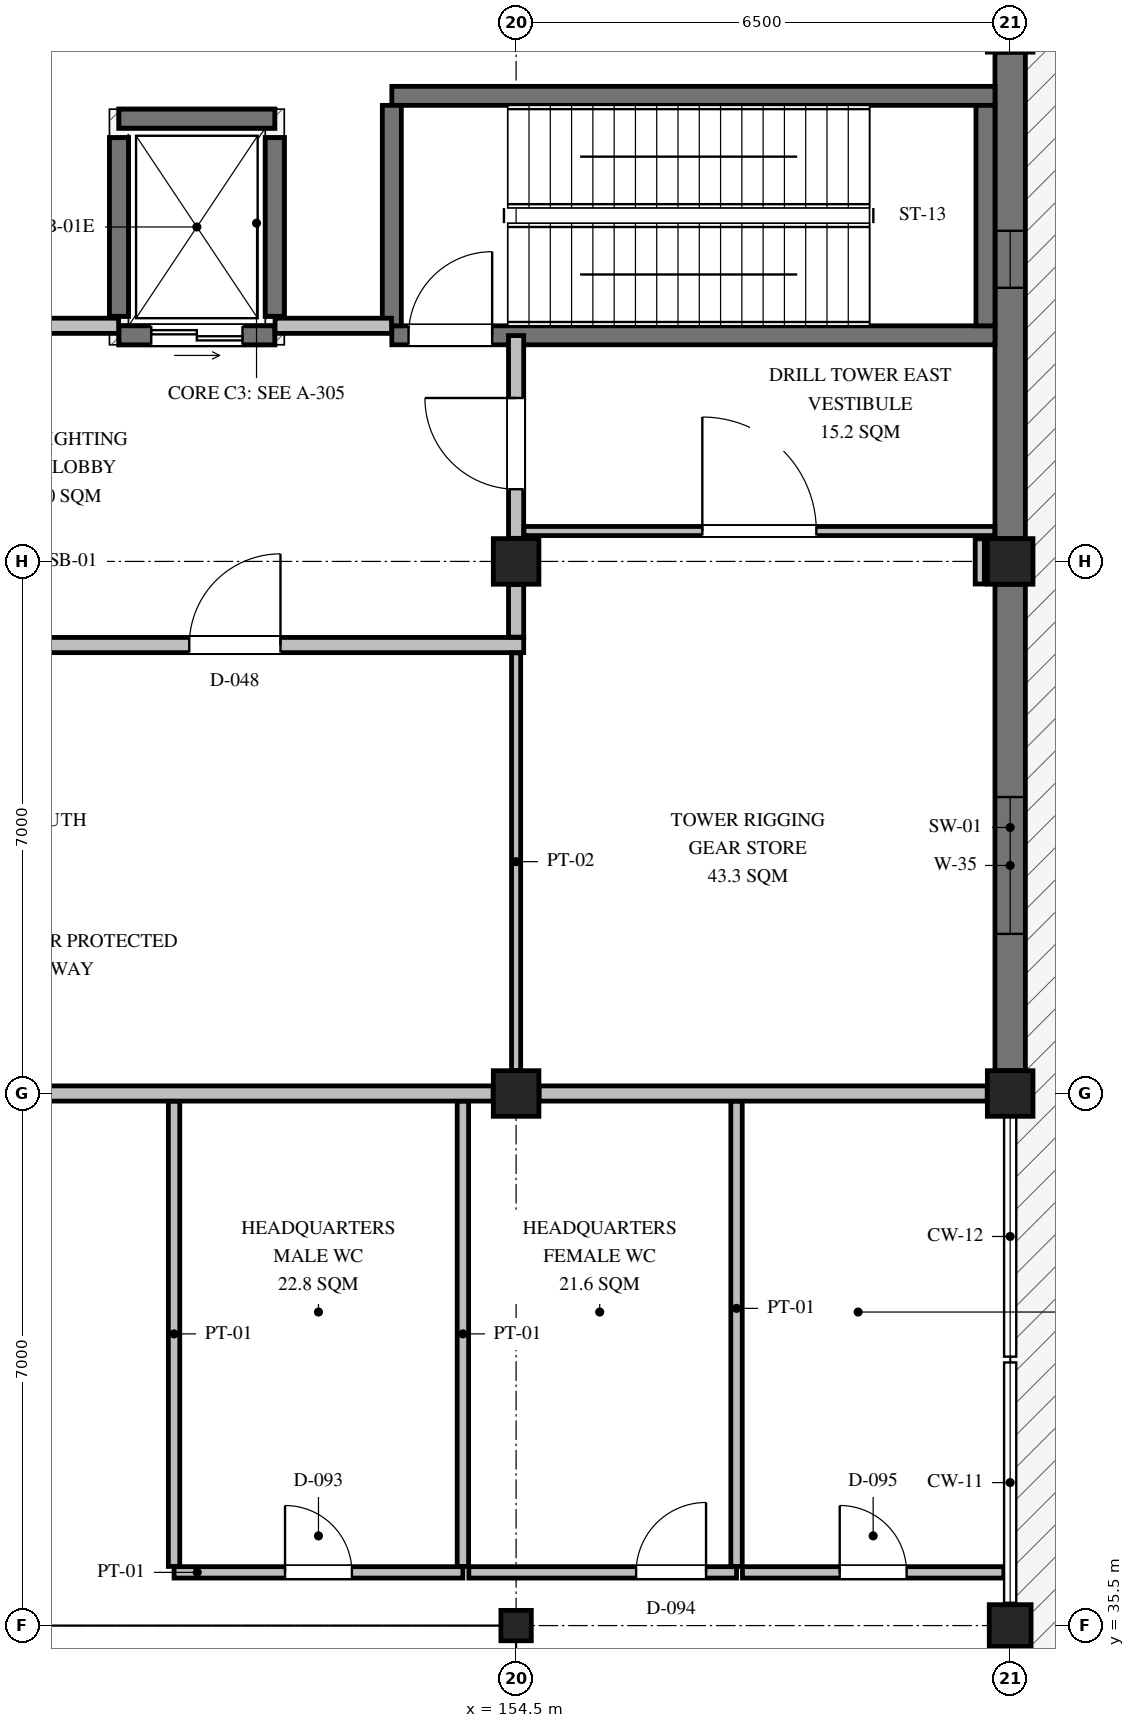
"""IFC4 building model, lengths in metres.
Left out: names, types, materials, properties, quantities, classifications, styles, units other than length and angle.
Written with IfcOpenShell. Run it as: python <this file> out.ifc"""

import sys

from ifc_helpers import new_model, si_unit, direction, frame, frame_2d, origin, origin_2d, place, context, subcontext, project, spatial, rectangle, hollow_rectangle, i_section, extrude, element, fill, save


model = new_model("IFC4")
c1 = context("Model", 3, precision=1e-05, world=origin(), true_north=direction((0.0, 1.0)))
c2 = subcontext(c1, "Body", "Model", "MODEL_VIEW")
j1 = project(units=[si_unit("LENGTHUNIT", "METRE"), si_unit("PLANEANGLEUNIT", "RADIAN")], contexts=[c1])
p1 = place(None, origin())
s1 = spatial("IfcSite", under=j1, at=p1, CompositionType="ELEMENT")
p2 = place(p1, origin())
s2 = spatial("IfcBuilding", under=s1, at=p2, CompositionType="ELEMENT")
p3 = place(p2, frame((0.0, 0.0, 0.45)))
s3 = spatial("IfcBuildingStorey", under=s2, at=p3, CompositionType="ELEMENT", Elevation=0.45)
p4 = place(p3, frame((154.5, 35.5, -0.45), z_axis=(0.0, 0.0, 1.0), x_axis=(1.0, 0.0, 0.0)))
e1 = element("IfcColumn", 1, at=p4, inside=s3, PredefinedType="COLUMN", context=c2, shape_type="SweptSolid", body=[
    extrude(i_section(OverallWidth=0.4, OverallDepth=0.4, WebThickness=0.013, FlangeThickness=0.021, FilletRadius=0.022, at=origin_2d()), origin(), (0.0, 0.0, 1.0), 5.85),
])
for number, where, z_axis, x_axis in (
    (2, (154.5, 42.5, -0.45), (0.0, 0.0, 1.0), (1.0, 0.0, 0.0)),
    (3, (154.5, 49.5, -0.45), (0.0, 0.0, 1.0), (1.0, 0.0, 0.0)),
):
    element("IfcColumn", number, at=place(p3, frame(where, z_axis=z_axis, x_axis=x_axis)), inside=s3, PredefinedType="COLUMN", context=c2, shape_type="SweptSolid", body=[
        extrude(rectangle(XDim=0.6, YDim=0.6, at=origin_2d()), origin(), (0.0, 0.0, 1.0), 5.85),
    ])
p5 = place(p3, frame((161.0, 35.5, -0.45), z_axis=(0.0, 0.0, 1.0), x_axis=(1.0, 0.0, 0.0)))
e4 = element("IfcColumn", 4, at=p5, inside=s3, PredefinedType="COLUMN", context=c2, shape_type="SweptSolid", body=[
    extrude(hollow_rectangle(XDim=0.55, YDim=0.55, WallThickness=0.026, at=origin_2d()), origin(), (0.0, 0.0, 1.0), 5.85),
])
for number, where, z_axis, x_axis in (
    (5, (161.0, 42.5, -0.45), (0.0, 0.0, 1.0), (1.0, 0.0, 0.0)),
    (6, (161.0, 49.5, -0.45), (0.0, 0.0, 1.0), (1.0, 0.0, 0.0)),
):
    element("IfcColumn", number, at=place(p3, frame(where, z_axis=z_axis, x_axis=x_axis)), inside=s3, PredefinedType="COLUMN", context=c2, shape_type="SweptSolid", body=[
        extrude(rectangle(XDim=0.6, YDim=0.6, at=origin_2d()), origin(), (0.0, 0.0, 1.0), 5.85),
    ])
p6 = place(p3, frame((161.0, 28.775, 0.0), z_axis=(0.0, 0.0, 1.0), x_axis=(0.0, 1.0, 0.0)))
e7 = element("IfcWall", 7, at=p6, inside=s3, PredefinedType="SOLIDWALL", context=c2, shape_type="SweptSolid", body=[
    extrude(rectangle(XDim=6.45, YDim=0.22, at=frame_2d((3.225, 0.0))), origin(), (0.0, 0.0, 1.0), 4.644),
])
p7 = place(p6, frame((4.4, 0.0, 0.0)))
e8 = element("IfcOpeningElement", 8, at=p7, cuts=e7, PredefinedType="OPENING", context=c2, shape_type="SweptSolid", body=[
    extrude(rectangle(XDim=1.4, YDim=2.35, at=frame_2d((0.7, 1.175))), frame((0.0, 0.12, 0.0), z_axis=(0.0, -1.0, 0.0), x_axis=(1.0, 0.0, 0.0)), (0.0, 0.0, 1.0), 0.24),
])
p8 = place(p3, frame((161.0, 42.8, 0.0), z_axis=(0.0, 0.0, 1.0), x_axis=(0.0, 1.0, 0.0)))
e9 = element("IfcWall", 9, at=p8, inside=s3, PredefinedType="SHEAR", context=c2, shape_type="SweptSolid", body=[
    extrude(rectangle(XDim=6.4, YDim=0.4, at=frame_2d((3.2, 0.0))), origin(), (0.0, 0.0, 1.0), 5.2),
])
p9 = place(p8, frame((1.8, 0.0, 0.9)))
e10 = element("IfcOpeningElement", 10, at=p9, cuts=e9, PredefinedType="OPENING", context=c2, shape_type="SweptSolid", body=[
    extrude(rectangle(XDim=1.8, YDim=2.1, at=frame_2d((0.9, 1.05))), frame((0.0, 0.21, 0.0), z_axis=(0.0, -1.0, 0.0), x_axis=(1.0, 0.0, 0.0)), (0.0, 0.0, 1.0), 0.42),
])
p10 = place(p3, frame((161.0, 49.8, 0.0), z_axis=(0.0, 0.0, 1.0), x_axis=(0.0, 1.0, 0.0)))
e11 = element("IfcWall", 11, at=p10, inside=s3, PredefinedType="SHEAR", context=c2, shape_type="SweptSolid", body=[
    extrude(rectangle(XDim=6.4, YDim=0.4, at=frame_2d((3.2, 0.0))), origin(), (0.0, 0.0, 1.0), 5.2),
])
p11 = place(p10, frame((3.3, 0.0, 1.1)))
e12 = element("IfcOpeningElement", 12, at=p11, cuts=e11, PredefinedType="OPENING", context=c2, shape_type="SweptSolid", body=[
    extrude(rectangle(XDim=0.75, YDim=0.75, at=frame_2d((0.375, 0.375))), frame((0.0, 0.21, 0.0), z_axis=(0.0, -1.0, 0.0), x_axis=(1.0, 0.0, 0.0)), (0.0, 0.0, 1.0), 0.42),
])
p12 = place(p3, frame((152.865, 52.475, 0.0), z_axis=(0.0, 0.0, 1.0), x_axis=(1.0, 0.0, 0.0)))
e13 = element("IfcWall", 13, at=p12, inside=s3, PredefinedType="SHEAR", context=c2, shape_type="SweptSolid", body=[
    extrude(rectangle(XDim=7.935, YDim=0.25, at=frame_2d((3.968, 0.0))), origin(), (0.0, 0.0, 1.0), 5.2),
])
p13 = place(p12, frame((0.22, 0.0, 0.0)))
e14 = element("IfcOpeningElement", 14, at=p13, cuts=e13, PredefinedType="OPENING", context=c2, shape_type="SweptSolid", body=[
    extrude(rectangle(XDim=1.1, YDim=2.15, at=frame_2d((0.55, 1.075))), frame((0.0, 0.135, 0.0), z_axis=(0.0, -1.0, 0.0), x_axis=(1.0, 0.0, 0.0)), (0.0, 0.0, 1.0), 0.27),
])
p14 = place(p3, frame((152.865, 55.625, 0.0), z_axis=(0.0, 0.0, 1.0), x_axis=(1.0, 0.0, 0.0)))
e15 = element("IfcWall", 15, at=p14, inside=s3, PredefinedType="SHEAR", context=c2, shape_type="SweptSolid", body=[
    extrude(rectangle(XDim=7.935, YDim=0.25, at=frame_2d((3.968, 0.0))), origin(), (0.0, 0.0, 1.0), 5.2),
])
for number, where, z_axis, x_axis in (
    (16, (152.865, 52.6, 0.0), (0.0, 0.0, 1.0), (0.0, 1.0, 0.0)),
    (17, (160.675, 52.6, 0.0), (0.0, 0.0, 1.0), (0.0, 1.0, 0.0)),
):
    element("IfcWall", number, at=place(p3, frame(where, z_axis=z_axis, x_axis=x_axis)), inside=s3, PredefinedType="SHEAR", context=c2, shape_type="SweptSolid", body=[
        extrude(rectangle(XDim=2.9, YDim=0.25, at=frame_2d((1.45, 0.0))), origin(), (0.0, 0.0, 1.0), 5.2),
    ])
for number, where, z_axis, x_axis in (
    (18, (149.275, 52.475, -1.65), (0.0, 0.0, 1.0), (1.0, 0.0, 0.0)),
    (19, (149.275, 55.325, -1.65), (0.0, 0.0, 1.0), (1.0, 0.0, 0.0)),
):
    element("IfcWall", number, at=place(p3, frame(where, z_axis=z_axis, x_axis=x_axis)), inside=s3, PredefinedType="SHEAR", context=c2, shape_type="SweptSolid", body=[
        extrude(rectangle(XDim=2.05, YDim=0.25, at=frame_2d((1.025, 0.0))), origin(), (0.0, 0.0, 1.0), 1.65),
    ])
for number, where, z_axis, x_axis in (
    (20, (149.275, 52.725, -1.65), (0.0, 0.0, 1.0), (0.0, 1.0, 0.0)),
    (21, (151.325, 52.725, -1.65), (0.0, 0.0, 1.0), (0.0, 1.0, 0.0)),
):
    element("IfcWall", number, at=place(p3, frame(where, z_axis=z_axis, x_axis=x_axis)), inside=s3, PredefinedType="SHEAR", context=c2, shape_type="SweptSolid", body=[
        extrude(rectangle(XDim=2.35, YDim=0.25, at=frame_2d((1.175, 0.0))), origin(), (0.0, 0.0, 1.0), 1.65),
    ])
p15 = place(p3, frame((149.275, 52.475, 0.0), z_axis=(0.0, 0.0, 1.0), x_axis=(1.0, 0.0, 0.0)))
e22 = element("IfcWall", 22, at=p15, inside=s3, PredefinedType="SHEAR", context=c2, shape_type="SweptSolid", body=[
    extrude(rectangle(XDim=2.05, YDim=0.25, at=frame_2d((1.025, 0.0))), origin(), (0.0, 0.0, 1.0), 5.2),
])
p16 = place(p15, frame((0.425, 0.0, 0.0)))
e23 = element("IfcOpeningElement", 23, at=p16, cuts=e22, PredefinedType="OPENING", context=c2, shape_type="SweptSolid", body=[
    extrude(rectangle(XDim=1.2, YDim=2.15, at=frame_2d((0.6, 1.075))), frame((0.0, 0.135, 0.0), z_axis=(0.0, -1.0, 0.0), x_axis=(1.0, 0.0, 0.0)), (0.0, 0.0, 1.0), 0.27),
])
p17 = place(p3, frame((149.275, 55.325, 0.0), z_axis=(0.0, 0.0, 1.0), x_axis=(1.0, 0.0, 0.0)))
e24 = element("IfcWall", 24, at=p17, inside=s3, PredefinedType="SHEAR", context=c2, shape_type="SweptSolid", body=[
    extrude(rectangle(XDim=2.05, YDim=0.25, at=frame_2d((1.025, 0.0))), origin(), (0.0, 0.0, 1.0), 5.2),
])
for number, where, z_axis, x_axis in (
    (25, (149.275, 52.725, 0.0), (0.0, 0.0, 1.0), (0.0, 1.0, 0.0)),
    (26, (151.325, 52.725, 0.0), (0.0, 0.0, 1.0), (0.0, 1.0, 0.0)),
):
    element("IfcWall", number, at=place(p3, frame(where, z_axis=z_axis, x_axis=x_axis)), inside=s3, PredefinedType="SHEAR", context=c2, shape_type="SweptSolid", body=[
        extrude(rectangle(XDim=2.35, YDim=0.25, at=frame_2d((1.175, 0.0))), origin(), (0.0, 0.0, 1.0), 5.2),
    ])
p18 = place(p3, frame((148.302, 42.5, 0.0), z_axis=(0.0, 0.0, 1.0), x_axis=(1.0, 0.0, 0.0)))
e27 = element("IfcWall", 27, at=p18, inside=s3, PredefinedType="PARTITIONING", context=c2, shape_type="SweptSolid", body=[
    extrude(rectangle(XDim=5.896, YDim=0.2, at=frame_2d((2.948, 0.0))), origin(), (0.0, 0.0, 1.0), 4.694),
])
p19 = place(p3, frame((154.802, 42.5, 0.0), z_axis=(0.0, 0.0, 1.0), x_axis=(1.0, 0.0, 0.0)))
e28 = element("IfcWall", 28, at=p19, inside=s3, PredefinedType="PARTITIONING", context=c2, shape_type="SweptSolid", body=[
    extrude(rectangle(XDim=5.896, YDim=0.2, at=frame_2d((2.948, 0.0))), origin(), (0.0, 0.0, 1.0), 4.394),
])
p20 = place(p3, frame((147.909, 52.6, 0.0), z_axis=(0.0, 0.0, 1.0), x_axis=(1.0, 0.0, 0.0)))
e29 = element("IfcWall", 29, at=p20, inside=s3, PredefinedType="PARTITIONING", context=c2, shape_type="SweptSolid", body=[
    extrude(rectangle(XDim=1.362, YDim=0.2, at=frame_2d((0.681, 0.0))), origin(), (0.0, 0.0, 1.0), 5.2),
])
p21 = place(p3, frame((151.329, 52.6, 0.0), z_axis=(0.0, 0.0, 1.0), x_axis=(1.0, 0.0, 0.0)))
e30 = element("IfcWall", 30, at=p21, inside=s3, PredefinedType="PARTITIONING", context=c2, shape_type="SweptSolid", body=[
    extrude(rectangle(XDim=1.532, YDim=0.2, at=frame_2d((0.766, 0.0))), origin(), (0.0, 0.0, 1.0), 5.2),
])
p22 = place(p3, frame((145.9, 48.4, 0.0), z_axis=(0.0, 0.0, 1.0), x_axis=(1.0, 0.0, 0.0)))
e31 = element("IfcWall", 31, at=p22, inside=s3, PredefinedType="PARTITIONING", context=c2, shape_type="SweptSolid", body=[
    extrude(rectangle(XDim=8.7, YDim=0.2, at=frame_2d((4.35, 0.0))), origin(), (0.0, 0.0, 1.0), 5.2),
])
p23 = place(p22, frame((4.3, 0.0, 0.0)))
e32 = element("IfcOpeningElement", 32, at=p23, cuts=e31, PredefinedType="OPENING", context=c2, shape_type="SweptSolid", body=[
    extrude(rectangle(XDim=1.2, YDim=2.15, at=frame_2d((0.6, 1.075))), frame((0.0, 0.11, 0.0), z_axis=(0.0, -1.0, 0.0), x_axis=(1.0, 0.0, 0.0)), (0.0, 0.0, 1.0), 0.22),
])
p24 = place(p3, frame((154.5, 48.504, 0.0), z_axis=(0.0, 0.0, 1.0), x_axis=(0.0, 1.0, 0.0)))
e33 = element("IfcWall", 33, at=p24, inside=s3, PredefinedType="PARTITIONING", context=c2, shape_type="SweptSolid", body=[
    extrude(rectangle(XDim=0.692, YDim=0.2, at=frame_2d((0.346, 0.0))), origin(), (0.0, 0.0, 1.0), 4.854),
])
p25 = place(p3, frame((154.5, 49.804, 0.0), z_axis=(0.0, 0.0, 1.0), x_axis=(0.0, 1.0, 0.0)))
e34 = element("IfcWall", 34, at=p25, inside=s3, PredefinedType="PARTITIONING", context=c2, shape_type="SweptSolid", body=[
    extrude(rectangle(XDim=2.667, YDim=0.2, at=frame_2d((1.333, 0.0))), origin(), (0.0, 0.0, 1.0), 5.2),
])
p26 = place(p25, frame((0.646, 0.0, 0.0)))
e35 = element("IfcOpeningElement", 35, at=p26, cuts=e34, PredefinedType="OPENING", context=c2, shape_type="SweptSolid", body=[
    extrude(rectangle(XDim=1.2, YDim=2.15, at=frame_2d((0.6, 1.075))), frame((0.0, 0.11, 0.0), z_axis=(0.0, -1.0, 0.0), x_axis=(1.0, 0.0, 0.0)), (0.0, 0.0, 1.0), 0.22),
])
p27 = place(p3, frame((150.0, 36.2, 0.0), z_axis=(0.0, 0.0, 1.0), x_axis=(1.0, 0.0, 0.0)))
e36 = element("IfcWall", 36, at=p27, inside=s3, PredefinedType="PARTITIONING", context=c2, shape_type="SweptSolid", body=[
    extrude(rectangle(XDim=3.8, YDim=0.15, at=frame_2d((1.9, 0.0))), origin(), (0.0, 0.0, 1.0), 5.2),
])
p28 = place(p27, frame((1.46, 0.0, 0.0)))
e37 = element("IfcOpeningElement", 37, at=p28, cuts=e36, PredefinedType="OPENING", context=c2, shape_type="SweptSolid", body=[
    extrude(rectangle(XDim=0.88, YDim=2.1, at=frame_2d((0.44, 1.05))), frame((0.0, 0.085, 0.0), z_axis=(0.0, -1.0, 0.0), x_axis=(1.0, 0.0, 0.0)), (0.0, 0.0, 1.0), 0.17),
])
p29 = place(p3, frame((150.0, 36.278, 0.0), z_axis=(0.0, 0.0, 1.0), x_axis=(0.0, 1.0, 0.0)))
e38 = element("IfcWall", 38, at=p29, inside=s3, PredefinedType="PARTITIONING", context=c2, shape_type="SweptSolid", body=[
    extrude(rectangle(XDim=6.119, YDim=0.15, at=frame_2d((3.06, 0.0))), origin(), (0.0, 0.0, 1.0), 4.95),
])
p30 = place(p3, frame((153.8, 36.278, 0.0), z_axis=(0.0, 0.0, 1.0), x_axis=(0.0, 1.0, 0.0)))
e39 = element("IfcWall", 39, at=p30, inside=s3, PredefinedType="PARTITIONING", context=c2, shape_type="SweptSolid", body=[
    extrude(rectangle(XDim=6.119, YDim=0.15, at=frame_2d((3.06, 0.0))), origin(), (0.0, 0.0, 1.0), 5.2),
])
p31 = place(p3, frame((153.878, 36.2, 0.0), z_axis=(0.0, 0.0, 1.0), x_axis=(1.0, 0.0, 0.0)))
e40 = element("IfcWall", 40, at=p31, inside=s3, PredefinedType="PARTITIONING", context=c2, shape_type="SweptSolid", body=[
    extrude(rectangle(XDim=3.522, YDim=0.15, at=frame_2d((1.761, 0.0))), origin(), (0.0, 0.0, 1.0), 5.2),
])
p32 = place(p31, frame((2.201, 0.0, 0.0)))
e41 = element("IfcOpeningElement", 41, at=p32, cuts=e40, PredefinedType="OPENING", context=c2, shape_type="SweptSolid", body=[
    extrude(rectangle(XDim=0.92, YDim=2.1, at=frame_2d((0.46, 1.05))), frame((0.0, 0.085, 0.0), z_axis=(0.0, -1.0, 0.0), x_axis=(1.0, 0.0, 0.0)), (0.0, 0.0, 1.0), 0.17),
])
p33 = place(p3, frame((157.4, 36.278, 0.0), z_axis=(0.0, 0.0, 1.0), x_axis=(0.0, 1.0, 0.0)))
e42 = element("IfcWall", 42, at=p33, inside=s3, PredefinedType="PARTITIONING", context=c2, shape_type="SweptSolid", body=[
    extrude(rectangle(XDim=6.119, YDim=0.15, at=frame_2d((3.06, 0.0))), origin(), (0.0, 0.0, 1.0), 5.2),
])
p34 = place(p3, frame((157.478, 36.2, 0.0), z_axis=(0.0, 0.0, 1.0), x_axis=(1.0, 0.0, 0.0)))
e43 = element("IfcWall", 43, at=p34, inside=s3, PredefinedType="PARTITIONING", context=c2, shape_type="SweptSolid", body=[
    extrude(rectangle(XDim=3.439, YDim=0.15, at=frame_2d((1.719, 0.0))), origin(), (0.0, 0.0, 1.0), 5.2),
])
p35 = place(p34, frame((1.28, 0.0, 0.0)))
e44 = element("IfcOpeningElement", 44, at=p35, cuts=e43, PredefinedType="OPENING", context=c2, shape_type="SweptSolid", body=[
    extrude(rectangle(XDim=0.88, YDim=2.1, at=frame_2d((0.44, 1.05))), frame((0.0, 0.085, 0.0), z_axis=(0.0, -1.0, 0.0), x_axis=(1.0, 0.0, 0.0)), (0.0, 0.0, 1.0), 0.17),
])
p36 = place(p3, frame((154.603, 49.9, 0.0), z_axis=(0.0, 0.0, 1.0), x_axis=(1.0, 0.0, 0.0)))
e45 = element("IfcWall", 45, at=p36, inside=s3, PredefinedType="PARTITIONING", context=c2, shape_type="SweptSolid", body=[
    extrude(rectangle(XDim=6.194, YDim=0.12, at=frame_2d((3.097, 0.0))), origin(), (0.0, 0.0, 1.0), 5.2),
])
p37 = place(p36, frame((2.347, 0.0, 0.0)))
e46 = element("IfcOpeningElement", 46, at=p37, cuts=e45, PredefinedType="OPENING", context=c2, shape_type="SweptSolid", body=[
    extrude(rectangle(XDim=1.5, YDim=2.25, at=frame_2d((0.75, 1.125))), frame((0.0, 0.07, 0.0), z_axis=(0.0, -1.0, 0.0), x_axis=(1.0, 0.0, 0.0)), (0.0, 0.0, 1.0), 0.14),
])
p38 = place(p3, frame((154.5, 42.803, 0.0), z_axis=(0.0, 0.0, 1.0), x_axis=(0.0, 1.0, 0.0)))
e47 = element("IfcWall", 47, at=p38, inside=s3, PredefinedType="PARTITIONING", context=c2, shape_type="SweptSolid", body=[
    extrude(rectangle(XDim=5.494, YDim=0.12, at=frame_2d((2.747, 0.0))), origin(), (0.0, 0.0, 1.0), 4.854),
])
p39 = place(p3, frame((160.6, 49.203, 0.0), z_axis=(0.0, 0.0, 1.0), x_axis=(0.0, 1.0, 0.0)))
e48 = element("IfcWall", 48, at=p39, inside=s3, PredefinedType="PARTITIONING", context=c2, shape_type="SweptSolid", body=[
    extrude(rectangle(XDim=0.594, YDim=0.12, at=frame_2d((0.297, 0.0))), origin(), (0.0, 0.0, 1.0), 5.2),
])
p40 = place(p9, origin())
e49 = element("IfcWindow", 49, at=p40, inside=s3, PartitioningType="SINGLE_PANEL", PredefinedType="WINDOW", context=c2, shape_type="SweptSolid", body=[
    extrude(rectangle(XDim=1.8, YDim=2.1, at=frame_2d((0.9, 1.05))), frame((0.0, 0.03, 0.0), z_axis=(0.0, -1.0, 0.0), x_axis=(1.0, 0.0, 0.0)), (0.0, 0.0, 1.0), 0.06),
])
fill(e10, e49)
p41 = place(p11, origin())
e50 = element("IfcWindow", 50, at=p41, inside=s3, PartitioningType="SINGLE_PANEL", PredefinedType="WINDOW", context=c2, shape_type="SweptSolid", body=[
    extrude(rectangle(XDim=0.75, YDim=0.75, at=frame_2d((0.375, 0.375))), frame((0.0, 0.03, 0.0), z_axis=(0.0, -1.0, 0.0), x_axis=(1.0, 0.0, 0.0)), (0.0, 0.0, 1.0), 0.06),
])
fill(e12, e50)
p42 = place(p13, frame((1.1, 0.0, 0.0), z_axis=(0.0, 0.0, 1.0), x_axis=(-1.0, 0.0, 0.0)))
e51 = element("IfcDoor", 51, at=p42, inside=s3, OperationType="SINGLE_SWING_RIGHT", PredefinedType="DOOR", context=c2, shape_type="SweptSolid", body=[
    extrude(rectangle(XDim=1.1, YDim=2.15, at=frame_2d((0.55, 1.075))), frame((0.0, 0.025, 0.0), z_axis=(0.0, -1.0, 0.0), x_axis=(1.0, 0.0, 0.0)), (0.0, 0.0, 1.0), 0.05),
])
fill(e14, e51)
p43 = place(p16, origin())
e52 = element("IfcDoor", 52, at=p43, inside=s3, OperationType="DOUBLE_DOOR_SLIDING", PredefinedType="DOOR", context=c2, shape_type="SweptSolid", body=[
    extrude(rectangle(XDim=1.2, YDim=2.15, at=frame_2d((0.6, 1.075))), frame((0.0, 0.025, 0.0), z_axis=(0.0, -1.0, 0.0), x_axis=(1.0, 0.0, 0.0)), (0.0, 0.0, 1.0), 0.05),
])
fill(e23, e52)
p44 = place(p23, origin())
e53 = element("IfcDoor", 53, at=p44, inside=s3, OperationType="SINGLE_SWING_RIGHT", PredefinedType="DOOR", context=c2, shape_type="SweptSolid", body=[
    extrude(rectangle(XDim=1.2, YDim=2.15, at=frame_2d((0.6, 1.075))), frame((0.0, 0.025, 0.0), z_axis=(0.0, -1.0, 0.0), x_axis=(1.0, 0.0, 0.0)), (0.0, 0.0, 1.0), 0.05),
])
fill(e32, e53)
p45 = place(p26, origin())
e54 = element("IfcDoor", 54, at=p45, inside=s3, OperationType="SINGLE_SWING_RIGHT", PredefinedType="DOOR", context=c2, shape_type="SweptSolid", body=[
    extrude(rectangle(XDim=1.2, YDim=2.15, at=frame_2d((0.6, 1.075))), frame((0.0, 0.025, 0.0), z_axis=(0.0, -1.0, 0.0), x_axis=(1.0, 0.0, 0.0)), (0.0, 0.0, 1.0), 0.05),
])
fill(e35, e54)
p46 = place(p28, origin())
e55 = element("IfcDoor", 55, at=p46, inside=s3, OperationType="SINGLE_SWING_LEFT", PredefinedType="DOOR", context=c2, shape_type="SweptSolid", body=[
    extrude(rectangle(XDim=0.88, YDim=2.1, at=frame_2d((0.44, 1.05))), frame((0.0, 0.025, 0.0), z_axis=(0.0, -1.0, 0.0), x_axis=(1.0, 0.0, 0.0)), (0.0, 0.0, 1.0), 0.05),
])
fill(e37, e55)
p47 = place(p32, origin())
e56 = element("IfcDoor", 56, at=p47, inside=s3, OperationType="SINGLE_SWING_RIGHT", PredefinedType="DOOR", context=c2, shape_type="SweptSolid", body=[
    extrude(rectangle(XDim=0.92, YDim=2.1, at=frame_2d((0.46, 1.05))), frame((0.0, 0.025, 0.0), z_axis=(0.0, -1.0, 0.0), x_axis=(1.0, 0.0, 0.0)), (0.0, 0.0, 1.0), 0.05),
])
fill(e41, e56)
p48 = place(p35, origin())
e57 = element("IfcDoor", 57, at=p48, inside=s3, OperationType="SINGLE_SWING_LEFT", PredefinedType="DOOR", context=c2, shape_type="SweptSolid", body=[
    extrude(rectangle(XDim=0.88, YDim=2.1, at=frame_2d((0.44, 1.05))), frame((0.0, 0.025, 0.0), z_axis=(0.0, -1.0, 0.0), x_axis=(1.0, 0.0, 0.0)), (0.0, 0.0, 1.0), 0.05),
])
fill(e44, e57)
p49 = place(p37, origin())
e58 = element("IfcDoor", 58, at=p49, inside=s3, OperationType="SINGLE_SWING_LEFT", PredefinedType="DOOR", context=c2, shape_type="SweptSolid", body=[
    extrude(rectangle(XDim=1.5, YDim=2.25, at=frame_2d((0.75, 1.125))), frame((0.0, 0.025, 0.0), z_axis=(0.0, -1.0, 0.0), x_axis=(1.0, 0.0, 0.0)), (0.0, 0.0, 1.0), 0.05),
])
fill(e46, e58)
save(model, sys.argv[1])
